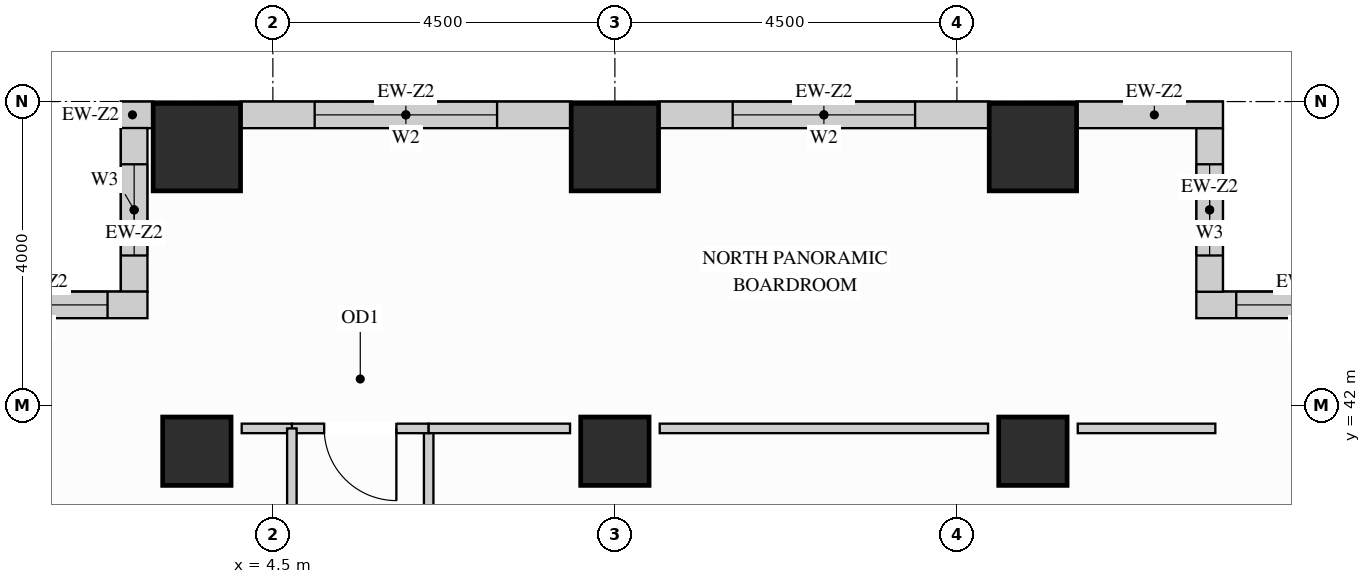
"""IFC4 building model, lengths in metres.
Left out: names, types, materials, properties, quantities, classifications, styles, units other than length and angle.
Written with IfcOpenShell. Run it as: python <this file> out.ifc"""

import sys

from ifc_helpers import new_model, si_unit, direction, frame, frame_2d, origin, origin_2d, place, context, subcontext, project, spatial, rectangle, extrude, source, transform, mapped, element, fill, save


model = new_model("IFC4")
c1 = context("Model", 3, precision=1e-05, world=origin(), true_north=direction((0.0, 1.0)))
c2 = subcontext(c1, "Body", "Model", "MODEL_VIEW")
j1 = project(units=[si_unit("LENGTHUNIT", "METRE"), si_unit("PLANEANGLEUNIT", "RADIAN")], contexts=[c1])
p1 = place(None, origin())
s1 = spatial("IfcSite", under=j1, at=p1, CompositionType="ELEMENT")
p2 = place(p1, origin())
s2 = spatial("IfcBuilding", under=s1, at=p2, CompositionType="ELEMENT")
p3 = place(p2, frame((0.0, 0.0, 84.6)))
s3 = spatial("IfcBuildingStorey", under=s2, at=p3, CompositionType="ELEMENT", Elevation=84.6)
m1 = source(origin(), c2, "Body", "SweptSolid", [
    extrude(rectangle(XDim=0.9, YDim=0.9, at=origin_2d()), origin(), (0.0, 0.0, 1.0), 3.38),
])
for number, where, z_axis, x_axis in (
    (1, (14.5, 41.4, 0.0), (0.0, 0.0, 1.0), (1.0, 0.0, 0.0)),
    (2, (3.5, 41.4, 0.0), (0.0, 0.0, 1.0), (1.0, 0.0, 0.0)),
    (3, (9.0, 41.4, 0.0), (0.0, 0.0, 1.0), (1.0, 0.0, 0.0)),
):
    element("IfcColumn", number, at=place(p3, frame(where, z_axis=z_axis, x_axis=x_axis)), inside=s3, PredefinedType="COLUMN", context=c2, shape_type="MappedRepresentation", body=[
        mapped(m1, transform((0.0, 0.0, 0.0), x_axis=(1.0, 0.0, 0.0), y_axis=(0.0, 1.0, 0.0), z_axis=(0.0, 0.0, 1.0))),
    ])
m2 = source(origin(), c2, "Body", "SweptSolid", [
    extrude(rectangle(XDim=1.15, YDim=1.15, at=origin_2d()), origin(), (0.0, 0.0, 1.0), 3.38),
])
for number, where, z_axis, x_axis in (
    (4, (14.5, 45.4, 0.0), (0.0, 0.0, 1.0), (1.0, 0.0, 0.0)),
    (5, (3.5, 45.4, 0.0), (0.0, 0.0, 1.0), (1.0, 0.0, 0.0)),
    (6, (9.0, 45.4, 0.0), (0.0, 0.0, 1.0), (1.0, 0.0, 0.0)),
):
    element("IfcColumn", number, at=place(p3, frame(where, z_axis=z_axis, x_axis=x_axis)), inside=s3, PredefinedType="COLUMN", context=c2, shape_type="MappedRepresentation", body=[
        mapped(m2, transform((0.0, 0.0, 0.0), x_axis=(1.0, 0.0, 0.0), y_axis=(0.0, 1.0, 0.0), z_axis=(0.0, 0.0, 1.0))),
    ])
p4 = place(p3, frame((19.5, 43.325, 0.0), z_axis=(0.0, 0.0, 1.0), x_axis=(-1.0, 0.0, 0.0)))
e7 = element("IfcWall", 7, at=p4, inside=s3, PredefinedType="SOLIDWALL", context=c2, shape_type="SweptSolid", body=[
    extrude(rectangle(XDim=2.85, YDim=0.35, at=frame_2d((1.425, 0.0))), origin(), (0.0, 0.0, 1.0), 3.365),
])
p5 = place(p4, frame((0.525, 0.0, 0.78)))
e8 = element("IfcOpeningElement", 8, at=p5, cuts=e7, PredefinedType="OPENING", context=c2, shape_type="SweptSolid", body=[
    extrude(rectangle(XDim=1.8, YDim=2.1, at=frame_2d((0.9, 1.05))), frame((0.0, 0.185, 0.0), z_axis=(0.0, -1.0, 0.0), x_axis=(1.0, 0.0, 0.0)), (0.0, 0.0, 1.0), 0.37),
])
p6 = place(p3, frame((16.825, 43.498, 0.0), z_axis=(0.0, 0.0, 1.0), x_axis=(0.0, 1.0, 0.0)))
e9 = element("IfcWall", 9, at=p6, inside=s3, PredefinedType="SOLIDWALL", context=c2, shape_type="SweptSolid", body=[
    extrude(rectangle(XDim=2.154, YDim=0.35, at=frame_2d((1.077, 0.0))), origin(), (0.0, 0.0, 1.0), 3.365),
])
p7 = place(p6, frame((0.477, 0.0, 0.78)))
e10 = element("IfcOpeningElement", 10, at=p7, cuts=e9, PredefinedType="OPENING", context=c2, shape_type="SweptSolid", body=[
    extrude(rectangle(XDim=1.2, YDim=2.1, at=frame_2d((0.6, 1.05))), frame((0.0, 0.185, 0.0), z_axis=(0.0, -1.0, 0.0), x_axis=(1.0, 0.0, 0.0)), (0.0, 0.0, 1.0), 0.37),
])
m3 = source(origin(), c2, "Body", "SweptSolid", [
    extrude(rectangle(XDim=1.927, YDim=0.35, at=frame_2d((0.963, 0.0))), origin(), (0.0, 0.0, 1.0), 3.365),
])
p8 = place(p3, frame((17.0, 45.825, 0.0), z_axis=(0.0, 0.0, 1.0), x_axis=(-1.0, 0.0, 0.0)))
e11 = element("IfcWall", 11, at=p8, inside=s3, PredefinedType="SOLIDWALL", context=c2, shape_type="MappedRepresentation", body=[
    mapped(m3, transform((0.0, 0.0, 0.0), x_axis=(1.0, 0.0, 0.0), y_axis=(0.0, 1.0, 0.0), z_axis=(0.0, 0.0, 1.0))),
])
p9 = place(p3, frame((13.927, 45.825, 0.0), z_axis=(0.0, 0.0, 1.0), x_axis=(-1.0, 0.0, 0.0)))
e12 = element("IfcWall", 12, at=p9, inside=s3, PredefinedType="SOLIDWALL", context=c2, shape_type="SweptSolid", body=[
    extrude(rectangle(XDim=4.354, YDim=0.35, at=frame_2d((2.177, 0.0))), origin(), (0.0, 0.0, 1.0), 3.365),
])
p10 = place(p9, frame((0.977, 0.0, 0.78)))
e13 = element("IfcOpeningElement", 13, at=p10, cuts=e12, PredefinedType="OPENING", context=c2, shape_type="SweptSolid", body=[
    extrude(rectangle(XDim=2.4, YDim=2.1, at=frame_2d((1.2, 1.05))), frame((0.0, 0.185, 0.0), z_axis=(0.0, -1.0, 0.0), x_axis=(1.0, 0.0, 0.0)), (0.0, 0.0, 1.0), 0.37),
])
p11 = place(p3, frame((8.427, 45.825, 0.0), z_axis=(0.0, 0.0, 1.0), x_axis=(-1.0, 0.0, 0.0)))
e14 = element("IfcWall", 14, at=p11, inside=s3, PredefinedType="SOLIDWALL", context=c2, shape_type="SweptSolid", body=[
    extrude(rectangle(XDim=4.354, YDim=0.35, at=frame_2d((2.177, 0.0))), origin(), (0.0, 0.0, 1.0), 3.365),
])
p12 = place(p11, frame((0.977, 0.0, 0.78)))
e15 = element("IfcOpeningElement", 15, at=p12, cuts=e14, PredefinedType="OPENING", context=c2, shape_type="SweptSolid", body=[
    extrude(rectangle(XDim=2.4, YDim=2.1, at=frame_2d((1.2, 1.05))), frame((0.0, 0.185, 0.0), z_axis=(0.0, -1.0, 0.0), x_axis=(1.0, 0.0, 0.0)), (0.0, 0.0, 1.0), 0.37),
])
m4 = source(origin(), c2, "Body", "SweptSolid", [
    extrude(rectangle(XDim=0.427, YDim=0.35, at=frame_2d((0.213, 0.0))), origin(), (0.0, 0.0, 1.0), 3.365),
])
p13 = place(p3, frame((2.927, 45.825, 0.0), z_axis=(0.0, 0.0, 1.0), x_axis=(-1.0, 0.0, 0.0)))
e16 = element("IfcWall", 16, at=p13, inside=s3, PredefinedType="SOLIDWALL", context=c2, shape_type="MappedRepresentation", body=[
    mapped(m4, transform((0.0, 0.0, 0.0), x_axis=(1.0, 0.0, 0.0), y_axis=(0.0, 1.0, 0.0), z_axis=(0.0, 0.0, 1.0))),
])
p14 = place(p3, frame((2.675, 45.652, 0.0), z_axis=(0.0, 0.0, 1.0), x_axis=(0.0, -1.0, 0.0)))
e17 = element("IfcWall", 17, at=p14, inside=s3, PredefinedType="SOLIDWALL", context=c2, shape_type="SweptSolid", body=[
    extrude(rectangle(XDim=2.154, YDim=0.35, at=frame_2d((1.077, 0.0))), origin(), (0.0, 0.0, 1.0), 3.365),
])
p15 = place(p14, frame((0.477, 0.0, 0.78)))
e18 = element("IfcOpeningElement", 18, at=p15, cuts=e17, PredefinedType="OPENING", context=c2, shape_type="SweptSolid", body=[
    extrude(rectangle(XDim=1.2, YDim=2.1, at=frame_2d((0.6, 1.05))), frame((0.0, 0.185, 0.0), z_axis=(0.0, -1.0, 0.0), x_axis=(1.0, 0.0, 0.0)), (0.0, 0.0, 1.0), 0.37),
])
p16 = place(p3, frame((2.85, 43.325, 0.0), z_axis=(0.0, 0.0, 1.0), x_axis=(-1.0, 0.0, 0.0)))
e19 = element("IfcWall", 19, at=p16, inside=s3, PredefinedType="SOLIDWALL", context=c2, shape_type="SweptSolid", body=[
    extrude(rectangle(XDim=2.85, YDim=0.35, at=frame_2d((1.425, 0.0))), origin(), (0.0, 0.0, 1.0), 3.365),
])
p17 = place(p16, frame((0.525, 0.0, 0.78)))
e20 = element("IfcOpeningElement", 20, at=p17, cuts=e19, PredefinedType="OPENING", context=c2, shape_type="SweptSolid", body=[
    extrude(rectangle(XDim=1.8, YDim=2.1, at=frame_2d((0.9, 1.05))), frame((0.0, 0.185, 0.0), z_axis=(0.0, -1.0, 0.0), x_axis=(1.0, 0.0, 0.0)), (0.0, 0.0, 1.0), 0.37),
])
p18 = place(p3, frame((6.55, 33.15, 0.0), z_axis=(0.0, 0.0, 1.0), x_axis=(0.0, 1.0, 0.0)))
e21 = element("IfcWall", 21, at=p18, inside=s3, PredefinedType="PARTITIONING", context=c2, shape_type="SweptSolid", body=[
    extrude(rectangle(XDim=8.55, YDim=0.125, at=frame_2d((4.275, 0.0))), origin(), (0.0, 0.0, 1.0), 3.365),
])
p19 = place(p18, frame((3.8, 0.0, 0.0)))
e22 = element("IfcOpeningElement", 22, at=p19, cuts=e21, PredefinedType="OPENING", context=c2, shape_type="SweptSolid", body=[
    extrude(rectangle(XDim=0.95, YDim=2.15, at=frame_2d((0.475, 1.075))), frame((0.0, 0.073, 0.0), z_axis=(0.0, -1.0, 0.0), x_axis=(1.0, 0.0, 0.0)), (0.0, 0.0, 1.0), 0.145),
])
p20 = place(p3, frame((4.75, 41.7, 0.0), z_axis=(0.0, 0.0, 1.0), x_axis=(1.0, 0.0, 0.0)))
e23 = element("IfcWall", 23, at=p20, inside=s3, PredefinedType="PARTITIONING", context=c2, shape_type="SweptSolid", body=[
    extrude(rectangle(XDim=1.8, YDim=0.125, at=frame_2d((0.9, 0.0))), origin(), (0.0, 0.0, 1.0), 3.365),
])
p21 = place(p20, frame((0.425, 0.0, 0.0)))
e24 = element("IfcOpeningElement", 24, at=p21, cuts=e23, PredefinedType="OPENING", context=c2, shape_type="SweptSolid", body=[
    extrude(rectangle(XDim=0.95, YDim=2.15, at=frame_2d((0.475, 1.075))), frame((0.0, 0.073, 0.0), z_axis=(0.0, -1.0, 0.0), x_axis=(1.0, 0.0, 0.0)), (0.0, 0.0, 1.0), 0.145),
])
m5 = source(origin(), c2, "Body", "SweptSolid", [
    extrude(rectangle(XDim=1.86, YDim=0.125, at=frame_2d((0.93, 0.0))), origin(), (0.0, 0.0, 1.0), 3.365),
])
p22 = place(p3, frame((6.55, 41.7, 0.0), z_axis=(0.0, 0.0, 1.0), x_axis=(1.0, 0.0, 0.0)))
e25 = element("IfcWall", 25, at=p22, inside=s3, PredefinedType="PARTITIONING", context=c2, shape_type="MappedRepresentation", body=[
    mapped(m5, transform((0.0, 0.0, 0.0), x_axis=(1.0, 0.0, 0.0), y_axis=(0.0, 1.0, 0.0), z_axis=(0.0, 0.0, 1.0))),
])
m6 = source(origin(), c2, "Body", "SweptSolid", [
    extrude(rectangle(XDim=4.32, YDim=0.125, at=frame_2d((2.16, 0.0))), origin(), (0.0, 0.0, 1.0), 3.365),
])
p23 = place(p3, frame((9.59, 41.7, 0.0), z_axis=(0.0, 0.0, 1.0), x_axis=(1.0, 0.0, 0.0)))
e26 = element("IfcWall", 26, at=p23, inside=s3, PredefinedType="PARTITIONING", context=c2, shape_type="MappedRepresentation", body=[
    mapped(m6, transform((0.0, 0.0, 0.0), x_axis=(1.0, 0.0, 0.0), y_axis=(0.0, 1.0, 0.0), z_axis=(0.0, 0.0, 1.0))),
])
m7 = source(origin(), c2, "Body", "SweptSolid", [
    extrude(rectangle(XDim=1.81, YDim=0.125, at=frame_2d((0.905, 0.0))), origin(), (0.0, 0.0, 1.0), 3.365),
])
p24 = place(p3, frame((15.09, 41.7, 0.0), z_axis=(0.0, 0.0, 1.0), x_axis=(1.0, 0.0, 0.0)))
e27 = element("IfcWall", 27, at=p24, inside=s3, PredefinedType="PARTITIONING", context=c2, shape_type="MappedRepresentation", body=[
    mapped(m7, transform((0.0, 0.0, 0.0), x_axis=(1.0, 0.0, 0.0), y_axis=(0.0, 1.0, 0.0), z_axis=(0.0, 0.0, 1.0))),
])
m8 = source(origin(), c2, "Body", "SweptSolid", [
    extrude(rectangle(XDim=0.66, YDim=0.125, at=frame_2d((0.33, 0.0))), origin(), (0.0, 0.0, 1.0), 3.365),
])
p25 = place(p3, frame((4.09, 41.7, 0.0), z_axis=(0.0, 0.0, 1.0), x_axis=(1.0, 0.0, 0.0)))
e28 = element("IfcWall", 28, at=p25, inside=s3, PredefinedType="PARTITIONING", context=c2, shape_type="MappedRepresentation", body=[
    mapped(m8, transform((0.0, 0.0, 0.0), x_axis=(1.0, 0.0, 0.0), y_axis=(0.0, 1.0, 0.0), z_axis=(0.0, 0.0, 1.0))),
])
p26 = place(p3, frame((4.75, 37.596, 0.0), z_axis=(0.0, 0.0, 1.0), x_axis=(0.0, 1.0, 0.0)))
e29 = element("IfcWall", 29, at=p26, inside=s3, PredefinedType="PARTITIONING", context=c2, shape_type="SweptSolid", body=[
    extrude(rectangle(XDim=4.104, YDim=0.125, at=frame_2d((2.052, 0.0))), origin(), (0.0, 0.0, 1.0), 3.365),
])
p27 = place(p26, frame((1.577, 0.0, 0.0)))
e30 = element("IfcOpeningElement", 30, at=p27, cuts=e29, PredefinedType="OPENING", context=c2, shape_type="SweptSolid", body=[
    extrude(rectangle(XDim=0.95, YDim=2.15, at=frame_2d((0.475, 1.075))), frame((0.0, 0.073, 0.0), z_axis=(0.0, -1.0, 0.0), x_axis=(1.0, 0.0, 0.0)), (0.0, 0.0, 1.0), 0.145),
])
m9 = source(origin(), c2, "Body", "SweptSolid", [
    extrude(rectangle(XDim=0.95, YDim=2.15, at=frame_2d((0.475, 1.075))), frame((0.0, 0.025, 0.0), z_axis=(0.0, -1.0, 0.0), x_axis=(1.0, 0.0, 0.0)), (0.0, 0.0, 1.0), 0.05),
])
p28 = place(p21, origin())
e31 = element("IfcDoor", 31, at=p28, inside=s3, OperationType="SINGLE_SWING_RIGHT", PredefinedType="DOOR", context=c2, shape_type="MappedRepresentation", body=[
    mapped(m9, transform((0.0, 0.0, 0.0), x_axis=(1.0, 0.0, 0.0), y_axis=(0.0, 1.0, 0.0), z_axis=(0.0, 0.0, 1.0))),
])
fill(e24, e31)
m10 = source(origin(), c2, "Body", "SweptSolid", [
    extrude(rectangle(XDim=1.8, YDim=2.1, at=frame_2d((0.9, 1.05))), frame((0.0, 0.03, 0.0), z_axis=(0.0, -1.0, 0.0), x_axis=(1.0, 0.0, 0.0)), (0.0, 0.0, 1.0), 0.06),
])
p29 = place(p5, origin())
e32 = element("IfcWindow", 32, at=p29, inside=s3, PartitioningType="SINGLE_PANEL", PredefinedType="WINDOW", context=c2, shape_type="MappedRepresentation", body=[
    mapped(m10, transform((0.0, 0.0, 0.0), x_axis=(1.0, 0.0, 0.0), y_axis=(0.0, 1.0, 0.0), z_axis=(0.0, 0.0, 1.0))),
])
fill(e8, e32)
p30 = place(p17, origin())
e33 = element("IfcWindow", 33, at=p30, inside=s3, PartitioningType="SINGLE_PANEL", PredefinedType="WINDOW", context=c2, shape_type="MappedRepresentation", body=[
    mapped(m10, transform((0.0, 0.0, 0.0), x_axis=(1.0, 0.0, 0.0), y_axis=(0.0, 1.0, 0.0), z_axis=(0.0, 0.0, 1.0))),
])
fill(e20, e33)
m11 = source(origin(), c2, "Body", "SweptSolid", [
    extrude(rectangle(XDim=2.4, YDim=2.1, at=frame_2d((1.2, 1.05))), frame((0.0, 0.03, 0.0), z_axis=(0.0, -1.0, 0.0), x_axis=(1.0, 0.0, 0.0)), (0.0, 0.0, 1.0), 0.06),
])
p31 = place(p10, origin())
e34 = element("IfcWindow", 34, at=p31, inside=s3, PartitioningType="SINGLE_PANEL", PredefinedType="WINDOW", context=c2, shape_type="MappedRepresentation", body=[
    mapped(m11, transform((0.0, 0.0, 0.0), x_axis=(1.0, 0.0, 0.0), y_axis=(0.0, 1.0, 0.0), z_axis=(0.0, 0.0, 1.0))),
])
fill(e13, e34)
p32 = place(p12, origin())
e35 = element("IfcWindow", 35, at=p32, inside=s3, PartitioningType="SINGLE_PANEL", PredefinedType="WINDOW", context=c2, shape_type="MappedRepresentation", body=[
    mapped(m11, transform((0.0, 0.0, 0.0), x_axis=(1.0, 0.0, 0.0), y_axis=(0.0, 1.0, 0.0), z_axis=(0.0, 0.0, 1.0))),
])
fill(e15, e35)
m12 = source(origin(), c2, "Body", "SweptSolid", [
    extrude(rectangle(XDim=1.2, YDim=2.1, at=frame_2d((0.6, 1.05))), frame((0.0, 0.03, 0.0), z_axis=(0.0, -1.0, 0.0), x_axis=(1.0, 0.0, 0.0)), (0.0, 0.0, 1.0), 0.06),
])
p33 = place(p7, origin())
e36 = element("IfcWindow", 36, at=p33, inside=s3, PartitioningType="SINGLE_PANEL", PredefinedType="WINDOW", context=c2, shape_type="MappedRepresentation", body=[
    mapped(m12, transform((0.0, 0.0, 0.0), x_axis=(1.0, 0.0, 0.0), y_axis=(0.0, 1.0, 0.0), z_axis=(0.0, 0.0, 1.0))),
])
fill(e10, e36)
p34 = place(p15, origin())
e37 = element("IfcWindow", 37, at=p34, inside=s3, PartitioningType="SINGLE_PANEL", PredefinedType="WINDOW", context=c2, shape_type="MappedRepresentation", body=[
    mapped(m12, transform((0.0, 0.0, 0.0), x_axis=(1.0, 0.0, 0.0), y_axis=(0.0, 1.0, 0.0), z_axis=(0.0, 0.0, 1.0))),
])
fill(e18, e37)
save(model, sys.argv[1])
